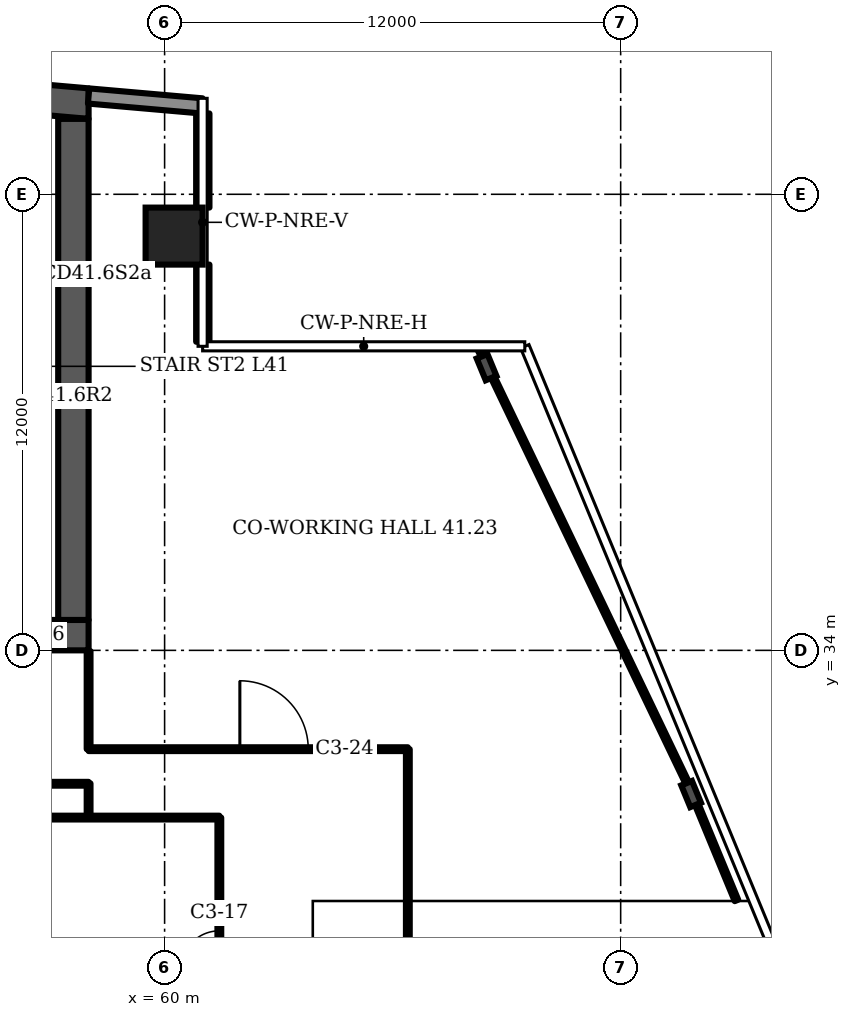
"""IFC4 building model, lengths in metres.
Left out: names, types, materials, properties, quantities, classifications, styles, units other than length and angle.
Written with IfcOpenShell. Run it as: python <this file> out.ifc"""

import sys

from ifc_helpers import new_model, si_unit, direction, frame, frame_2d, origin, origin_2d, place, context, subcontext, project, spatial, polyline, rectangle, i_section, outline, extrude, element, fill, save


model = new_model("IFC4")
c1 = context("Model", 3, precision=1e-05, world=origin(), true_north=direction((0.0, 1.0)))
c2 = subcontext(c1, "Body", "Model", "MODEL_VIEW")
j1 = project(units=[si_unit("LENGTHUNIT", "METRE"), si_unit("PLANEANGLEUNIT", "RADIAN")], contexts=[c1])
p1 = place(None, origin())
s1 = spatial("IfcSite", under=j1, at=p1, CompositionType="ELEMENT")
p2 = place(p1, origin())
s2 = spatial("IfcBuilding", under=s1, at=p2, CompositionType="ELEMENT")
p3 = place(p2, frame((0.0, 0.0, 169.9)))
s3 = spatial("IfcBuildingStorey", under=s2, at=p3, CompositionType="ELEMENT", Elevation=169.9)
p4 = place(p3, origin())
e1 = element("IfcWall", 1, at=p4, inside=s3, PredefinedType="SHEAR", context=c2, shape_type="SweptSolid", body=[
    extrude(outline(polyline([(16.0, 47.984), (37.0, 49.822), (58.0, 47.984), (58.0, 48.787), (37.0, 50.625), (16.0, 48.787), (16.0, 47.984)])), origin(), (0.0, 0.0, 1.0), 3.6),
])
p5 = place(p3, frame((16.0, 34.4, 0.0), z_axis=(0.0, 0.0, 1.0), x_axis=(1.0, 0.0, 0.0)))
e2 = element("IfcWall", 2, at=p5, inside=s3, PredefinedType="SHEAR", context=c2, shape_type="SweptSolid", body=[
    extrude(rectangle(XDim=42.0, YDim=0.8, at=frame_2d((21.0, 0.0))), origin(), (0.0, 0.0, 1.0), 3.6),
])
p6 = place(p5, frame((1.75, 0.0, 0.0)))
e3 = element("IfcOpeningElement", 3, at=p6, cuts=e2, PredefinedType="OPENING", context=c2, shape_type="SweptSolid", body=[
    extrude(rectangle(XDim=1.0, YDim=2.1, at=frame_2d((0.5, 1.05))), frame((0.0, 0.41, 0.0), z_axis=(0.0, -1.0, 0.0), x_axis=(1.0, 0.0, 0.0)), (0.0, 0.0, 1.0), 0.82),
])
p7 = place(p5, frame((4.65, 0.0, 0.0)))
e4 = element("IfcOpeningElement", 4, at=p7, cuts=e2, PredefinedType="OPENING", context=c2, shape_type="SweptSolid", body=[
    extrude(rectangle(XDim=1.0, YDim=2.1, at=frame_2d((0.5, 1.05))), frame((0.0, 0.41, 0.0), z_axis=(0.0, -1.0, 0.0), x_axis=(1.0, 0.0, 0.0)), (0.0, 0.0, 1.0), 0.82),
])
p8 = place(p5, frame((7.65, 0.0, 0.0)))
e5 = element("IfcOpeningElement", 5, at=p8, cuts=e2, PredefinedType="OPENING", context=c2, shape_type="SweptSolid", body=[
    extrude(rectangle(XDim=1.2, YDim=2.1, at=frame_2d((0.6, 1.05))), frame((0.0, 0.41, 0.0), z_axis=(0.0, -1.0, 0.0), x_axis=(1.0, 0.0, 0.0)), (0.0, 0.0, 1.0), 0.82),
])
p9 = place(p5, frame((14.767, 0.0, 0.0)))
e6 = element("IfcOpeningElement", 6, at=p9, cuts=e2, PredefinedType="OPENING", context=c2, shape_type="SweptSolid", body=[
    extrude(rectangle(XDim=1.1, YDim=2.1, at=frame_2d((0.55, 1.05))), frame((0.0, 0.41, 0.0), z_axis=(0.0, -1.0, 0.0), x_axis=(1.0, 0.0, 0.0)), (0.0, 0.0, 1.0), 0.82),
])
p10 = place(p5, frame((19.133, 0.0, 0.0)))
e7 = element("IfcOpeningElement", 7, at=p10, cuts=e2, PredefinedType="OPENING", context=c2, shape_type="SweptSolid", body=[
    extrude(rectangle(XDim=1.1, YDim=2.1, at=frame_2d((0.55, 1.05))), frame((0.0, 0.41, 0.0), z_axis=(0.0, -1.0, 0.0), x_axis=(1.0, 0.0, 0.0)), (0.0, 0.0, 1.0), 0.82),
])
p11 = place(p5, frame((16.8, 0.0, 0.0)))
e8 = element("IfcOpeningElement", 8, at=p11, cuts=e2, PredefinedType="OPENING", context=c2, shape_type="SweptSolid", body=[
    extrude(rectangle(XDim=1.4, YDim=2.1, at=frame_2d((0.7, 1.05))), frame((0.0, 0.41, 0.0), z_axis=(0.0, -1.0, 0.0), x_axis=(1.0, 0.0, 0.0)), (0.0, 0.0, 1.0), 0.82),
])
p12 = place(p5, frame((21.767, 0.0, 0.0)))
e9 = element("IfcOpeningElement", 9, at=p12, cuts=e2, PredefinedType="OPENING", context=c2, shape_type="SweptSolid", body=[
    extrude(rectangle(XDim=1.1, YDim=2.1, at=frame_2d((0.55, 1.05))), frame((0.0, 0.41, 0.0), z_axis=(0.0, -1.0, 0.0), x_axis=(1.0, 0.0, 0.0)), (0.0, 0.0, 1.0), 0.82),
])
p13 = place(p5, frame((23.95, 0.0, 0.0)))
e10 = element("IfcOpeningElement", 10, at=p13, cuts=e2, PredefinedType="OPENING", context=c2, shape_type="SweptSolid", body=[
    extrude(rectangle(XDim=1.1, YDim=2.1, at=frame_2d((0.55, 1.05))), frame((0.0, 0.41, 0.0), z_axis=(0.0, -1.0, 0.0), x_axis=(1.0, 0.0, 0.0)), (0.0, 0.0, 1.0), 0.82),
])
p14 = place(p5, frame((26.133, 0.0, 0.0)))
e11 = element("IfcOpeningElement", 11, at=p14, cuts=e2, PredefinedType="OPENING", context=c2, shape_type="SweptSolid", body=[
    extrude(rectangle(XDim=1.1, YDim=2.1, at=frame_2d((0.55, 1.05))), frame((0.0, 0.41, 0.0), z_axis=(0.0, -1.0, 0.0), x_axis=(1.0, 0.0, 0.0)), (0.0, 0.0, 1.0), 0.82),
])
p15 = place(p5, frame((33.15, 0.0, 0.0)))
e12 = element("IfcOpeningElement", 12, at=p15, cuts=e2, PredefinedType="OPENING", context=c2, shape_type="SweptSolid", body=[
    extrude(rectangle(XDim=1.2, YDim=2.1, at=frame_2d((0.6, 1.05))), frame((0.0, 0.41, 0.0), z_axis=(0.0, -1.0, 0.0), x_axis=(1.0, 0.0, 0.0)), (0.0, 0.0, 1.0), 0.82),
])
p16 = place(p5, frame((37.767, 0.0, 0.0)))
e13 = element("IfcOpeningElement", 13, at=p16, cuts=e2, PredefinedType="OPENING", context=c2, shape_type="SweptSolid", body=[
    extrude(rectangle(XDim=1.4, YDim=2.1, at=frame_2d((0.7, 1.05))), frame((0.0, 0.41, 0.0), z_axis=(0.0, -1.0, 0.0), x_axis=(1.0, 0.0, 0.0)), (0.0, 0.0, 1.0), 0.82),
])
p17 = place(p3, frame((57.6, 34.8, 0.0), z_axis=(0.0, 0.0, 1.0), x_axis=(0.0, 1.0, 0.0)))
e14 = element("IfcWall", 14, at=p17, inside=s3, PredefinedType="SHEAR", context=c2, shape_type="SweptSolid", body=[
    extrude(rectangle(XDim=13.184, YDim=0.8, at=frame_2d((6.592, 0.0))), origin(), (0.0, 0.0, 1.0), 3.6),
])
p18 = place(p3, frame((60.25, 44.9, 0.0), z_axis=(0.0, 0.0, 1.0), x_axis=(1.0, 0.0, 0.0)))
e15 = element("IfcColumn", 15, at=p18, inside=s3, PredefinedType="COLUMN", context=c2, shape_type="SweptSolid", body=[
    extrude(rectangle(XDim=1.5, YDim=1.5, at=origin_2d()), origin(), (0.0, 0.0, 1.0), 3.6),
])
for number, where, z_axis, x_axis in (
    (16, (73.854, 30.219, 0.0), (0.0, 0.0, 1.0), (0.924, 0.382, 0.0)),
    (17, (68.472, 41.45, 0.0), (0.0, 0.0, 1.0), (0.924, 0.382, 0.0)),
):
    element("IfcColumn", number, at=place(p3, frame(where, z_axis=z_axis, x_axis=x_axis)), inside=s3, PredefinedType="COLUMN", context=c2, shape_type="SweptSolid", body=[
        extrude(i_section(OverallWidth=0.305, OverallDepth=0.62, WebThickness=0.021, FlangeThickness=0.04, FilletRadius=0.027, at=origin_2d()), origin(), (0.0, 0.0, 1.0), 3.6),
    ])
p19 = place(p3, frame((60.983, 48.326, 0.0), z_axis=(0.0, 0.0, 1.0), x_axis=(-0.996194, 0.087168, 0.0)))
e18 = element("IfcWall", 18, at=p19, inside=s3, PredefinedType="SOLIDWALL", context=c2, shape_type="SweptSolid", body=[
    extrude(rectangle(XDim=2.994, YDim=0.4, at=frame_2d((1.497, 0.0))), origin(), (0.0, 0.0, 1.0), 3.2),
])
p20 = place(p3, frame((61.005, 42.12, 0.0), z_axis=(0.0, 0.0, 1.0), x_axis=(0.0, 1.0, 0.0)))
e19 = element("IfcWall", 19, at=p20, inside=s3, PredefinedType="SOLIDWALL", context=c2, shape_type="SweptSolid", body=[
    extrude(rectangle(XDim=2.03, YDim=0.35, at=frame_2d((1.015, 0.0))), origin(), (0.0, 0.0, 1.0), 1.0),
])
p21 = place(p3, frame((61.005, 45.65, 0.0), z_axis=(0.0, 0.0, 1.0), x_axis=(0.0, 1.0, 0.0)))
e20 = element("IfcWall", 20, at=p21, inside=s3, PredefinedType="SOLIDWALL", context=c2, shape_type="SweptSolid", body=[
    extrude(rectangle(XDim=2.477, YDim=0.35, at=frame_2d((1.238, 0.0))), origin(), (0.0, 0.0, 1.0), 1.0),
])
p22 = place(p3, frame((51.4, 40.7, 0.0), z_axis=(0.0, 0.0, 1.0), x_axis=(1.0, 0.0, 0.0)))
e21 = element("IfcWall", 21, at=p22, inside=s3, PredefinedType="PARTITIONING", context=c2, shape_type="SweptSolid", body=[
    extrude(rectangle(XDim=5.8, YDim=0.2, at=frame_2d((2.9, 0.0))), origin(), (0.0, 0.0, 1.0), 3.2),
])
p23 = place(p22, frame((0.367, 0.0, 0.0)))
e22 = element("IfcOpeningElement", 22, at=p23, cuts=e21, PredefinedType="OPENING", context=c2, shape_type="SweptSolid", body=[
    extrude(rectangle(XDim=1.1, YDim=2.1, at=frame_2d((0.55, 1.05))), frame((0.0, 0.11, 0.0), z_axis=(0.0, -1.0, 0.0), x_axis=(1.0, 0.0, 0.0)), (0.0, 0.0, 1.0), 0.22),
])
p24 = place(p22, frame((3.417, 0.0, 0.0)))
e23 = element("IfcOpeningElement", 23, at=p24, cuts=e21, PredefinedType="OPENING", context=c2, shape_type="SweptSolid", body=[
    extrude(rectangle(XDim=1.0, YDim=2.1, at=frame_2d((0.5, 1.05))), frame((0.0, 0.11, 0.0), z_axis=(0.0, -1.0, 0.0), x_axis=(1.0, 0.0, 0.0)), (0.0, 0.0, 1.0), 0.22),
])
p25 = place(p3, frame((51.4, 43.9, 0.0), z_axis=(0.0, 0.0, 1.0), x_axis=(1.0, 0.0, 0.0)))
e24 = element("IfcWall", 24, at=p25, inside=s3, PredefinedType="PARTITIONING", context=c2, shape_type="SweptSolid", body=[
    extrude(rectangle(XDim=5.8, YDim=0.2, at=frame_2d((2.9, 0.0))), origin(), (0.0, 0.0, 1.0), 3.2),
])
p26 = place(p25, frame((2.283, 0.0, 0.0)))
e25 = element("IfcOpeningElement", 25, at=p26, cuts=e24, PredefinedType="OPENING", context=c2, shape_type="SweptSolid", body=[
    extrude(rectangle(XDim=1.0, YDim=2.1, at=frame_2d((0.5, 1.05))), frame((0.0, 0.11, 0.0), z_axis=(0.0, -1.0, 0.0), x_axis=(1.0, 0.0, 0.0)), (0.0, 0.0, 1.0), 0.22),
])
p27 = place(p25, frame((4.167, 0.0, 0.0)))
e26 = element("IfcOpeningElement", 26, at=p27, cuts=e24, PredefinedType="OPENING", context=c2, shape_type="SweptSolid", body=[
    extrude(rectangle(XDim=1.0, YDim=2.1, at=frame_2d((0.5, 1.05))), frame((0.0, 0.11, 0.0), z_axis=(0.0, -1.0, 0.0), x_axis=(1.0, 0.0, 0.0)), (0.0, 0.0, 1.0), 0.22),
])
p28 = place(p3, frame((46.91, 30.49, 0.0), z_axis=(0.0, 0.0, 1.0), x_axis=(1.0, 0.0, 0.0)))
e27 = element("IfcWall", 27, at=p28, inside=s3, PredefinedType="PARTITIONING", context=c2, shape_type="SweptSolid", body=[
    extrude(rectangle(XDim=11.09, YDim=0.1, at=frame_2d((5.545, 0.0))), origin(), (0.0, 0.0, 1.0), 3.2),
])
p29 = place(p28, frame((0.235, 0.0, 0.0)))
e28 = element("IfcOpeningElement", 28, at=p29, cuts=e27, PredefinedType="OPENING", context=c2, shape_type="SweptSolid", body=[
    extrude(rectangle(XDim=1.1, YDim=2.1, at=frame_2d((0.55, 1.05))), frame((0.0, 0.06, 0.0), z_axis=(0.0, -1.0, 0.0), x_axis=(1.0, 0.0, 0.0)), (0.0, 0.0, 1.0), 0.12),
])
p30 = place(p3, frame((55.0, 29.6, 0.0), z_axis=(0.0, 0.0, 1.0), x_axis=(1.0, 0.0, 0.0)))
e29 = element("IfcWall", 29, at=p30, inside=s3, PredefinedType="PARTITIONING", context=c2, shape_type="SweptSolid", body=[
    extrude(rectangle(XDim=6.44, YDim=0.1, at=frame_2d((3.22, 0.0))), origin(), (0.0, 0.0, 1.0), 3.2),
])
p31 = place(p3, frame((58.0, 29.6, 0.0), z_axis=(0.0, 0.0, 1.0), x_axis=(0.0, 1.0, 0.0)))
e30 = element("IfcWall", 30, at=p31, inside=s3, PredefinedType="PARTITIONING", context=c2, shape_type="SweptSolid", body=[
    extrude(rectangle(XDim=0.9, YDim=0.1, at=frame_2d((0.45, 0.0))), origin(), (0.0, 0.0, 1.0), 3.2),
])
p32 = place(p3, frame((58.0, 31.4, 0.0), z_axis=(0.0, 0.0, 1.0), x_axis=(0.0, 1.0, 0.0)))
e31 = element("IfcWall", 31, at=p32, inside=s3, PredefinedType="PARTITIONING", context=c2, shape_type="SweptSolid", body=[
    extrude(rectangle(XDim=2.58, YDim=0.1, at=frame_2d((1.29, 0.0))), origin(), (0.0, 0.0, 1.0), 3.2),
])
p33 = place(p3, frame((58.0, 31.4, 0.0), z_axis=(0.0, 0.0, 1.0), x_axis=(1.0, 0.0, 0.0)))
e32 = element("IfcWall", 32, at=p33, inside=s3, PredefinedType="PARTITIONING", context=c2, shape_type="SweptSolid", body=[
    extrude(rectangle(XDim=8.4, YDim=0.1, at=frame_2d((4.2, 0.0))), origin(), (0.0, 0.0, 1.0), 3.2),
])
p34 = place(p33, frame((3.98, 0.0, 0.0)))
e33 = element("IfcOpeningElement", 33, at=p34, cuts=e32, PredefinedType="OPENING", context=c2, shape_type="SweptSolid", body=[
    extrude(rectangle(XDim=1.8, YDim=2.1, at=frame_2d((0.9, 1.05))), frame((0.0, 0.06, 0.0), z_axis=(0.0, -1.0, 0.0), x_axis=(1.0, 0.0, 0.0)), (0.0, 0.0, 1.0), 0.12),
])
p35 = place(p3, frame((61.44, 24.8, 0.0), z_axis=(0.0, 0.0, 1.0), x_axis=(0.0, 1.0, 0.0)))
e34 = element("IfcWall", 34, at=p35, inside=s3, PredefinedType="PARTITIONING", context=c2, shape_type="SweptSolid", body=[
    extrude(rectangle(XDim=4.8, YDim=0.1, at=frame_2d((2.4, 0.0))), origin(), (0.0, 0.0, 1.0), 3.2),
])
p36 = place(p35, frame((0.82, 0.0, 0.0)))
e35 = element("IfcOpeningElement", 35, at=p36, cuts=e34, PredefinedType="OPENING", context=c2, shape_type="SweptSolid", body=[
    extrude(rectangle(XDim=1.0, YDim=2.1, at=frame_2d((0.5, 1.05))), frame((0.0, 0.06, 0.0), z_axis=(0.0, -1.0, 0.0), x_axis=(1.0, 0.0, 0.0)), (0.0, 0.0, 1.0), 0.12),
])
p37 = place(p3, frame((66.4, 26.075, 0.0), z_axis=(0.0, 0.0, 1.0), x_axis=(0.0, 1.0, 0.0)))
e36 = element("IfcWall", 36, at=p37, inside=s3, PredefinedType="PARTITIONING", context=c2, shape_type="SweptSolid", body=[
    extrude(rectangle(XDim=5.325, YDim=0.1, at=frame_2d((2.663, 0.0))), origin(), (0.0, 0.0, 1.0), 3.2),
])
p38 = place(p3, frame((73.885, 30.23, 0.0), z_axis=(0.0, 0.0, 1.0), x_axis=(-0.432129, 0.901808, 0.0)))
e37 = element("IfcWall", 37, at=p38, inside=s3, PredefinedType="PARTITIONING", context=c2, shape_type="SweptSolid", body=[
    extrude(rectangle(XDim=13.029, YDim=0.1, at=frame_2d((6.515, 0.0))), origin(), (0.0, 0.0, 1.0), 3.2),
])
p39 = place(p3, frame((75.047, 27.42, 0.0), z_axis=(0.0, 0.0, 1.0), x_axis=(-0.382024, 0.924148, 0.0)))
e38 = element("IfcWall", 38, at=p39, inside=s3, PredefinedType="PARTITIONING", context=c2, shape_type="SweptSolid", body=[
    extrude(rectangle(XDim=3.041, YDim=0.1, at=frame_2d((1.521, 0.0))), origin(), (0.0, 0.0, 1.0), 2.58),
])
p40 = place(p36, origin())
e39 = element("IfcDoor", 39, at=p40, inside=s3, OperationType="SINGLE_SWING_LEFT", PredefinedType="DOOR", context=c2, shape_type="SweptSolid", body=[
    extrude(rectangle(XDim=1.0, YDim=2.1, at=frame_2d((0.5, 1.05))), frame((0.0, 0.025, 0.0), z_axis=(0.0, -1.0, 0.0), x_axis=(1.0, 0.0, 0.0)), (0.0, 0.0, 1.0), 0.05),
])
fill(e35, e39)
p41 = place(p34, origin())
e40 = element("IfcDoor", 40, at=p41, inside=s3, OperationType="DOUBLE_DOOR_SINGLE_SWING", PredefinedType="DOOR", context=c2, shape_type="SweptSolid", body=[
    extrude(rectangle(XDim=1.8, YDim=2.1, at=frame_2d((0.9, 1.05))), frame((0.0, 0.025, 0.0), z_axis=(0.0, -1.0, 0.0), x_axis=(1.0, 0.0, 0.0)), (0.0, 0.0, 1.0), 0.05),
])
fill(e33, e40)
save(model, sys.argv[1])
